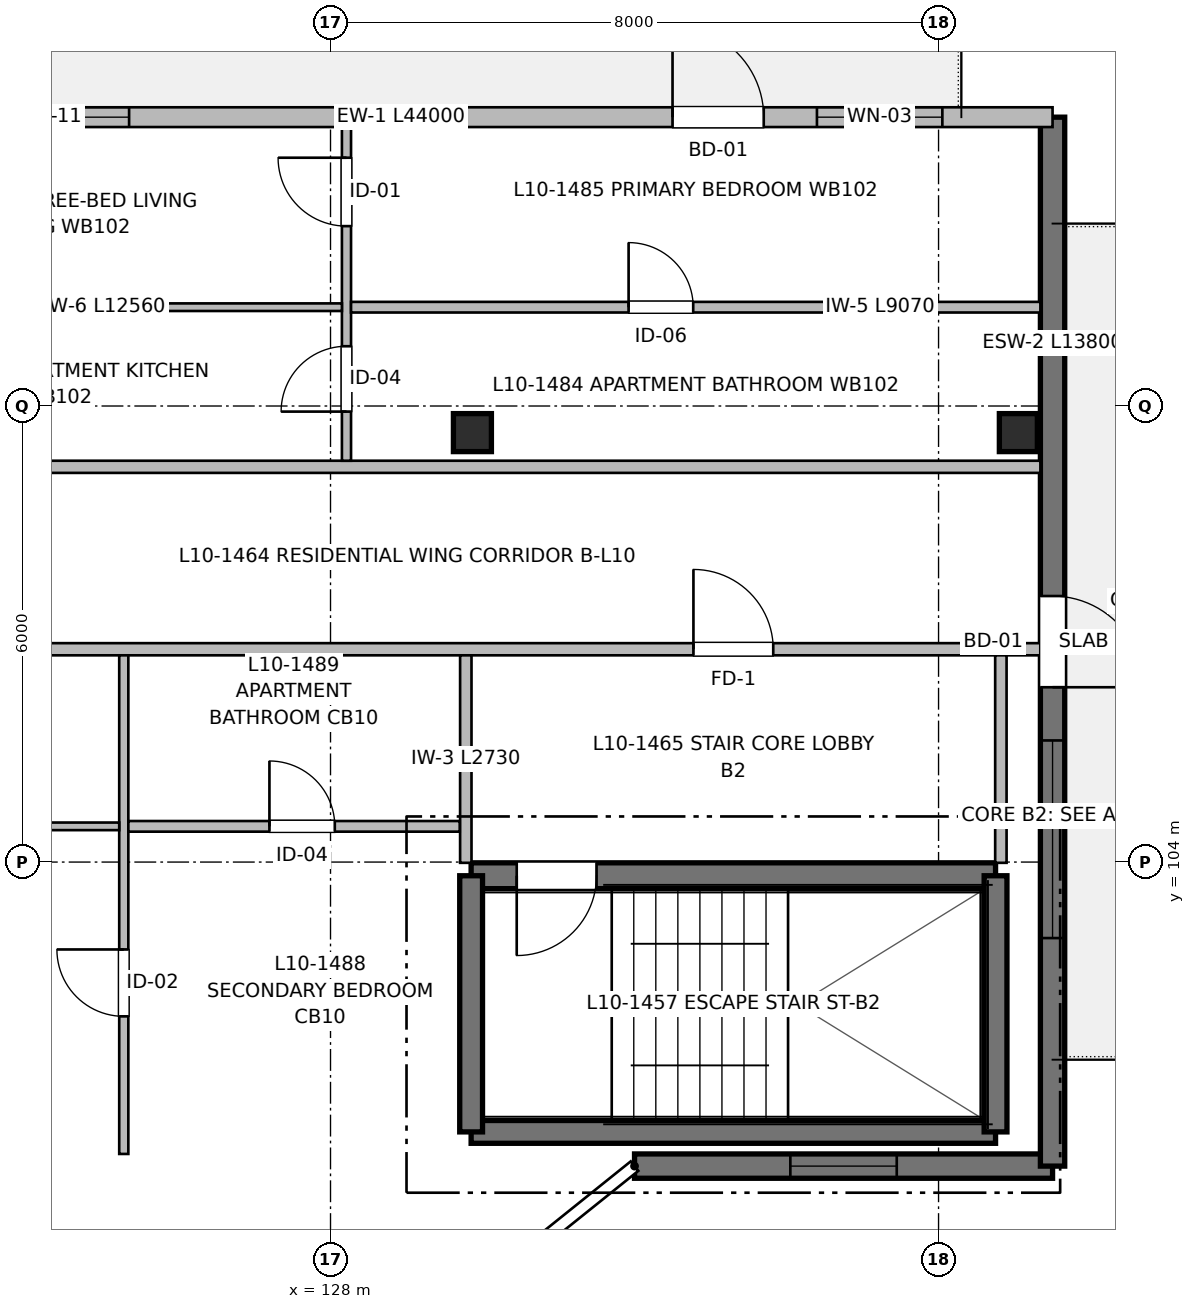
"""IFC4 building model, lengths in metres.
Left out: names, types, materials, properties, quantities, classifications, styles, units other than length and angle.
Written with IfcOpenShell. Run it as: python <this file> out.ifc"""

import sys

from ifc_helpers import new_model, si_unit, direction, frame, frame_2d, origin, origin_2d, place, context, subcontext, project, spatial, rectangle, extrude, element, fill, save


model = new_model("IFC4")
c1 = context("Model", 3, precision=1e-05, world=origin(), true_north=direction((0.0, 1.0)))
c2 = subcontext(c1, "Body", "Model", "MODEL_VIEW")
j1 = project(units=[si_unit("LENGTHUNIT", "METRE"), si_unit("PLANEANGLEUNIT", "RADIAN")], contexts=[c1])
p1 = place(None, origin())
s1 = spatial("IfcSite", under=j1, at=p1, CompositionType="ELEMENT")
p2 = place(p1, origin())
s2 = spatial("IfcBuilding", under=s1, at=p2, CompositionType="ELEMENT")
p3 = place(p2, frame((0.0, 0.0, 32.96)))
s3 = spatial("IfcBuildingStorey", under=s2, at=p3, CompositionType="ELEMENT", Elevation=32.96)
for number, where, z_axis, x_axis in (
    (1, (129.867, 109.65, 0.0), (0.0, 0.0, 1.0), (1.0, 0.0, 0.0)),
    (2, (137.05, 109.65, 0.0), (0.0, 0.0, 1.0), (1.0, 0.0, 0.0)),
):
    element("IfcColumn", number, at=place(p3, frame(where, z_axis=z_axis, x_axis=x_axis)), inside=s3, PredefinedType="COLUMN", context=c2, shape_type="SweptSolid", body=[
        extrude(rectangle(XDim=0.5, YDim=0.5, at=origin_2d()), origin(), (0.0, 0.0, 1.0), 3.2),
    ])
p4 = place(p3, frame((129.85, 100.45, 0.0), z_axis=(0.0, 0.0, 1.0), x_axis=(1.0, 0.0, 0.0)))
e3 = element("IfcWall", 3, at=p4, inside=s3, PredefinedType="SHEAR", context=c2, shape_type="SweptSolid", body=[
    extrude(rectangle(XDim=6.9, YDim=0.3, at=frame_2d((3.45, 0.0))), origin(), (0.0, 0.0, 1.0), 3.2),
])
p5 = place(p3, frame((136.75, 103.82, 0.0), z_axis=(0.0, 0.0, 1.0), x_axis=(-1.0, 0.0, 0.0)))
e4 = element("IfcWall", 4, at=p5, inside=s3, PredefinedType="SHEAR", context=c2, shape_type="SweptSolid", body=[
    extrude(rectangle(XDim=6.9, YDim=0.34, at=frame_2d((3.45, 0.0))), origin(), (0.0, 0.0, 1.0), 3.2),
])
p6 = place(p5, frame((5.25, 0.0, 0.0)))
e5 = element("IfcOpeningElement", 5, at=p6, cuts=e4, PredefinedType="OPENING", context=c2, shape_type="SweptSolid", body=[
    extrude(rectangle(XDim=1.05, YDim=2.15, at=frame_2d((0.525, 1.075))), frame((0.0, 0.18, 0.0), z_axis=(0.0, -1.0, 0.0), x_axis=(1.0, 0.0, 0.0)), (0.0, 0.0, 1.0), 0.36),
])
for number, where, z_axis, x_axis in (
    (6, (129.85, 103.82, 0.0), (0.0, 0.0, 1.0), (0.0, -1.0, 0.0)),
    (7, (136.75, 100.45, 0.0), (0.0, 0.0, 1.0), (0.0, 1.0, 0.0)),
):
    element("IfcWall", number, at=place(p3, frame(where, z_axis=z_axis, x_axis=x_axis)), inside=s3, PredefinedType="SHEAR", context=c2, shape_type="SweptSolid", body=[
        extrude(rectangle(XDim=3.37, YDim=0.3, at=frame_2d((1.685, 0.0))), origin(), (0.0, 0.0, 1.0), 3.2),
    ])
p7 = place(p3, frame((137.5, 100.0, 0.0), z_axis=(0.0, 0.0, 1.0), x_axis=(-1.0, 0.0, 0.0)))
e8 = element("IfcWall", 8, at=p7, inside=s3, PredefinedType="SHEAR", context=c2, shape_type="SweptSolid", body=[
    extrude(rectangle(XDim=5.5, YDim=0.32, at=frame_2d((2.75, 0.0))), origin(), (0.0, 0.0, 1.0), 2.98),
])
p8 = place(p7, frame((2.05, 0.0, 0.87)))
e9 = element("IfcOpeningElement", 9, at=p8, cuts=e8, PredefinedType="OPENING", context=c2, shape_type="SweptSolid", body=[
    extrude(rectangle(XDim=1.4, YDim=1.35, at=frame_2d((0.7, 0.675))), frame((0.0, 0.17, 0.0), z_axis=(0.0, -1.0, 0.0), x_axis=(1.0, 0.0, 0.0)), (0.0, 0.0, 1.0), 0.34),
])
p9 = place(p3, frame((137.5, 113.8, 0.0), z_axis=(0.0, 0.0, 1.0), x_axis=(0.0, -1.0, 0.0)))
e10 = element("IfcWall", 10, at=p9, inside=s3, PredefinedType="SHEAR", context=c2, shape_type="SweptSolid", body=[
    extrude(rectangle(XDim=13.8, YDim=0.32, at=frame_2d((6.9, 0.0))), origin(), (0.0, 0.0, 1.0), 2.98),
])
p10 = place(p9, frame((6.3, 0.0, 0.0)))
e11 = element("IfcOpeningElement", 11, at=p10, cuts=e10, PredefinedType="OPENING", context=c2, shape_type="SweptSolid", body=[
    extrude(rectangle(XDim=1.2, YDim=2.2, at=frame_2d((0.6, 1.1))), frame((0.0, 0.17, 0.0), z_axis=(0.0, -1.0, 0.0), x_axis=(1.0, 0.0, 0.0)), (0.0, 0.0, 1.0), 0.34),
])
p11 = place(p9, frame((8.2, 0.0, 0.67)))
e12 = element("IfcOpeningElement", 12, at=p11, cuts=e10, PredefinedType="OPENING", context=c2, shape_type="SweptSolid", body=[
    extrude(rectangle(XDim=2.6, YDim=1.55, at=frame_2d((1.3, 0.775))), frame((0.0, 0.17, 0.0), z_axis=(0.0, -1.0, 0.0), x_axis=(1.0, 0.0, 0.0)), (0.0, 0.0, 1.0), 0.34),
])
p12 = place(p3, frame((93.5, 113.8, 0.0), z_axis=(0.0, 0.0, 1.0), x_axis=(1.0, 0.0, 0.0)))
e13 = element("IfcWall", 13, at=p12, inside=s3, PredefinedType="SOLIDWALL", context=c2, shape_type="SweptSolid", body=[
    extrude(rectangle(XDim=44.0, YDim=0.26, at=frame_2d((22.0, 0.0))), origin(), (0.0, 0.0, 1.0), 2.98),
])
p13 = place(p12, frame((3.8, 0.0, 0.0)))
e14 = element("IfcOpeningElement", 14, at=p13, cuts=e13, PredefinedType="OPENING", context=c2, shape_type="SweptSolid", body=[
    extrude(rectangle(XDim=1.2, YDim=2.2, at=frame_2d((0.6, 1.1))), frame((0.0, 0.14, 0.0), z_axis=(0.0, -1.0, 0.0), x_axis=(1.0, 0.0, 0.0)), (0.0, 0.0, 1.0), 0.28),
])
p14 = place(p12, frame((5.7, 0.0, 0.67)))
e15 = element("IfcOpeningElement", 15, at=p14, cuts=e13, PredefinedType="OPENING", context=c2, shape_type="SweptSolid", body=[
    extrude(rectangle(XDim=2.6, YDim=1.55, at=frame_2d((1.3, 0.775))), frame((0.0, 0.14, 0.0), z_axis=(0.0, -1.0, 0.0), x_axis=(1.0, 0.0, 0.0)), (0.0, 0.0, 1.0), 0.28),
])
p15 = place(p12, frame((13.025, 0.0, 0.87)))
e16 = element("IfcOpeningElement", 16, at=p15, cuts=e13, PredefinedType="OPENING", context=c2, shape_type="SweptSolid", body=[
    extrude(rectangle(XDim=1.25, YDim=1.35, at=frame_2d((0.625, 0.675))), frame((0.0, 0.14, 0.0), z_axis=(0.0, -1.0, 0.0), x_axis=(1.0, 0.0, 0.0)), (0.0, 0.0, 1.0), 0.28),
])
p16 = place(p12, frame((20.1, 0.0, 0.0)))
e17 = element("IfcOpeningElement", 17, at=p16, cuts=e13, PredefinedType="OPENING", context=c2, shape_type="SweptSolid", body=[
    extrude(rectangle(XDim=1.2, YDim=2.2, at=frame_2d((0.6, 1.1))), frame((0.0, 0.14, 0.0), z_axis=(0.0, -1.0, 0.0), x_axis=(1.0, 0.0, 0.0)), (0.0, 0.0, 1.0), 0.28),
])
p17 = place(p12, frame((23.3, 0.0, 0.72)))
e18 = element("IfcOpeningElement", 18, at=p17, cuts=e13, PredefinedType="OPENING", context=c2, shape_type="SweptSolid", body=[
    extrude(rectangle(XDim=1.8, YDim=1.5, at=frame_2d((0.9, 0.75))), frame((0.0, 0.14, 0.0), z_axis=(0.0, -1.0, 0.0), x_axis=(1.0, 0.0, 0.0)), (0.0, 0.0, 1.0), 0.28),
])
p18 = place(p12, frame((29.75, 0.0, 0.67)))
e19 = element("IfcOpeningElement", 19, at=p18, cuts=e13, PredefinedType="OPENING", context=c2, shape_type="SweptSolid", body=[
    extrude(rectangle(XDim=2.1, YDim=1.55, at=frame_2d((1.05, 0.775))), frame((0.0, 0.14, 0.0), z_axis=(0.0, -1.0, 0.0), x_axis=(1.0, 0.0, 0.0)), (0.0, 0.0, 1.0), 0.28),
])
p19 = place(p12, frame((39.0, 0.0, 0.0)))
e20 = element("IfcOpeningElement", 20, at=p19, cuts=e13, PredefinedType="OPENING", context=c2, shape_type="SweptSolid", body=[
    extrude(rectangle(XDim=1.2, YDim=2.2, at=frame_2d((0.6, 1.1))), frame((0.0, 0.14, 0.0), z_axis=(0.0, -1.0, 0.0), x_axis=(1.0, 0.0, 0.0)), (0.0, 0.0, 1.0), 0.28),
])
p20 = place(p12, frame((40.9, 0.0, 0.77)))
e21 = element("IfcOpeningElement", 21, at=p20, cuts=e13, PredefinedType="OPENING", context=c2, shape_type="SweptSolid", body=[
    extrude(rectangle(XDim=1.65, YDim=1.45, at=frame_2d((0.825, 0.725))), frame((0.0, 0.14, 0.0), z_axis=(0.0, -1.0, 0.0), x_axis=(1.0, 0.0, 0.0)), (0.0, 0.0, 1.0), 0.28),
])
p21 = place(p3, frame((113.2, 106.8, 0.0), z_axis=(0.0, 0.0, 1.0), x_axis=(1.0, 0.0, 0.0)))
e22 = element("IfcWall", 22, at=p21, inside=s3, PredefinedType="PARTITIONING", context=c2, shape_type="SweptSolid", body=[
    extrude(rectangle(XDim=24.14, YDim=0.16, at=frame_2d((12.07, 0.0))), origin(), (0.0, 0.0, 1.0), 2.935),
])
p22 = place(p21, frame((19.575, 0.0, 0.0)))
e23 = element("IfcOpeningElement", 23, at=p22, cuts=e22, PredefinedType="OPENING", context=c2, shape_type="SweptSolid", body=[
    extrude(rectangle(XDim=1.05, YDim=2.15, at=frame_2d((0.525, 1.075))), frame((0.0, 0.09, 0.0), z_axis=(0.0, -1.0, 0.0), x_axis=(1.0, 0.0, 0.0)), (0.0, 0.0, 1.0), 0.18),
])
p23 = place(p21, frame((8.995, 0.0, 0.0)))
e24 = element("IfcOpeningElement", 24, at=p23, cuts=e22, PredefinedType="OPENING", context=c2, shape_type="SweptSolid", body=[
    extrude(rectangle(XDim=0.98, YDim=2.15, at=frame_2d((0.49, 1.075))), frame((0.0, 0.09, 0.0), z_axis=(0.0, -1.0, 0.0), x_axis=(1.0, 0.0, 0.0)), (0.0, 0.0, 1.0), 0.18),
])
p24 = place(p3, frame((93.66, 109.2, 0.0), z_axis=(0.0, 0.0, 1.0), x_axis=(1.0, 0.0, 0.0)))
e25 = element("IfcWall", 25, at=p24, inside=s3, PredefinedType="PARTITIONING", context=c2, shape_type="SweptSolid", body=[
    extrude(rectangle(XDim=43.68, YDim=0.16, at=frame_2d((21.84, 0.0))), origin(), (0.0, 0.0, 1.0), 2.935),
])
p25 = place(p24, frame((5.815, 0.0, 0.0)))
e26 = element("IfcOpeningElement", 26, at=p25, cuts=e25, PredefinedType="OPENING", context=c2, shape_type="SweptSolid", body=[
    extrude(rectangle(XDim=0.98, YDim=2.15, at=frame_2d((0.49, 1.075))), frame((0.0, 0.09, 0.0), z_axis=(0.0, -1.0, 0.0), x_axis=(1.0, 0.0, 0.0)), (0.0, 0.0, 1.0), 0.18),
])
p26 = place(p24, frame((27.35, 0.0, 0.0)))
e27 = element("IfcOpeningElement", 27, at=p26, cuts=e25, PredefinedType="OPENING", context=c2, shape_type="SweptSolid", body=[
    extrude(rectangle(XDim=0.98, YDim=2.15, at=frame_2d((0.49, 1.075))), frame((0.0, 0.09, 0.0), z_axis=(0.0, -1.0, 0.0), x_axis=(1.0, 0.0, 0.0)), (0.0, 0.0, 1.0), 0.18),
])
for number, where, z_axis, x_axis in (
    (28, (129.78, 103.99, 0.0), (0.0, 0.0, 1.0), (0.0, 1.0, 0.0)),
    (29, (136.82, 103.99, 0.0), (0.0, 0.0, 1.0), (0.0, 1.0, 0.0)),
):
    element("IfcWall", number, at=place(p3, frame(where, z_axis=z_axis, x_axis=x_axis)), inside=s3, PredefinedType="PARTITIONING", context=c2, shape_type="SweptSolid", body=[
        extrude(rectangle(XDim=2.73, YDim=0.15, at=frame_2d((1.365, 0.0))), origin(), (0.0, 0.0, 1.0), 2.935),
    ])
p27 = place(p3, frame((128.21, 109.28, 0.0), z_axis=(0.0, 0.0, 1.0), x_axis=(0.0, 1.0, 0.0)))
e30 = element("IfcWall", 30, at=p27, inside=s3, PredefinedType="PARTITIONING", context=c2, shape_type="SweptSolid", body=[
    extrude(rectangle(XDim=4.39, YDim=0.12, at=frame_2d((2.195, 0.0))), origin(), (0.0, 0.0, 1.0), 2.935),
])
p28 = place(p27, frame((0.646, 0.0, 0.0)))
e31 = element("IfcOpeningElement", 31, at=p28, cuts=e30, PredefinedType="OPENING", context=c2, shape_type="SweptSolid", body=[
    extrude(rectangle(XDim=0.86, YDim=2.1, at=frame_2d((0.43, 1.05))), frame((0.0, 0.07, 0.0), z_axis=(0.0, -1.0, 0.0), x_axis=(1.0, 0.0, 0.0)), (0.0, 0.0, 1.0), 0.14),
])
p29 = place(p27, frame((3.086, 0.0, 0.0)))
e32 = element("IfcOpeningElement", 32, at=p29, cuts=e30, PredefinedType="OPENING", context=c2, shape_type="SweptSolid", body=[
    extrude(rectangle(XDim=0.9, YDim=2.1, at=frame_2d((0.45, 1.05))), frame((0.0, 0.07, 0.0), z_axis=(0.0, -1.0, 0.0), x_axis=(1.0, 0.0, 0.0)), (0.0, 0.0, 1.0), 0.14),
])
p30 = place(p3, frame((128.27, 111.3, 0.0), z_axis=(0.0, 0.0, 1.0), x_axis=(1.0, 0.0, 0.0)))
e33 = element("IfcWall", 33, at=p30, inside=s3, PredefinedType="PARTITIONING", context=c2, shape_type="SweptSolid", body=[
    extrude(rectangle(XDim=9.07, YDim=0.14, at=frame_2d((4.535, 0.0))), origin(), (0.0, 0.0, 1.0), 2.935),
])
p31 = place(p30, frame((3.652, 0.0, 0.0)))
e34 = element("IfcOpeningElement", 34, at=p31, cuts=e33, PredefinedType="OPENING", context=c2, shape_type="SweptSolid", body=[
    extrude(rectangle(XDim=0.85, YDim=2.05, at=frame_2d((0.425, 1.025))), frame((0.0, 0.08, 0.0), z_axis=(0.0, -1.0, 0.0), x_axis=(1.0, 0.0, 0.0)), (0.0, 0.0, 1.0), 0.16),
])
p32 = place(p3, frame((115.59, 111.3, 0.0), z_axis=(0.0, 0.0, 1.0), x_axis=(1.0, 0.0, 0.0)))
e35 = element("IfcWall", 35, at=p32, inside=s3, PredefinedType="PARTITIONING", context=c2, shape_type="SweptSolid", body=[
    extrude(rectangle(XDim=12.56, YDim=0.1, at=frame_2d((6.28, 0.0))), origin(), (0.0, 0.0, 1.0), 2.935),
])
p33 = place(p32, frame((5.048, 0.0, 0.0)))
e36 = element("IfcOpeningElement", 36, at=p33, cuts=e35, PredefinedType="OPENING", context=c2, shape_type="SweptSolid", body=[
    extrude(rectangle(XDim=0.92, YDim=2.1, at=frame_2d((0.46, 1.05))), frame((0.0, 0.06, 0.0), z_axis=(0.0, -1.0, 0.0), x_axis=(1.0, 0.0, 0.0)), (0.0, 0.0, 1.0), 0.12),
])
p34 = place(p3, frame((125.28, 100.16, 0.0), z_axis=(0.0, 0.0, 1.0), x_axis=(0.0, 1.0, 0.0)))
e37 = element("IfcWall", 37, at=p34, inside=s3, PredefinedType="PARTITIONING", context=c2, shape_type="SweptSolid", body=[
    extrude(rectangle(XDim=6.56, YDim=0.12, at=frame_2d((3.28, 0.0))), origin(), (0.0, 0.0, 1.0), 2.935),
])
p35 = place(p34, frame((1.81, 0.0, 0.0)))
e38 = element("IfcOpeningElement", 38, at=p35, cuts=e37, PredefinedType="OPENING", context=c2, shape_type="SweptSolid", body=[
    extrude(rectangle(XDim=0.88, YDim=2.1, at=frame_2d((0.44, 1.05))), frame((0.0, 0.07, 0.0), z_axis=(0.0, -1.0, 0.0), x_axis=(1.0, 0.0, 0.0)), (0.0, 0.0, 1.0), 0.14),
])
p36 = place(p3, frame((125.34, 104.47, 0.0), z_axis=(0.0, 0.0, 1.0), x_axis=(1.0, 0.0, 0.0)))
e39 = element("IfcWall", 39, at=p36, inside=s3, PredefinedType="PARTITIONING", context=c2, shape_type="SweptSolid", body=[
    extrude(rectangle(XDim=4.36, YDim=0.14, at=frame_2d((2.18, 0.0))), origin(), (0.0, 0.0, 1.0), 2.935),
])
p37 = place(p36, frame((1.856, 0.0, 0.0)))
e40 = element("IfcOpeningElement", 40, at=p37, cuts=e39, PredefinedType="OPENING", context=c2, shape_type="SweptSolid", body=[
    extrude(rectangle(XDim=0.86, YDim=2.1, at=frame_2d((0.43, 1.05))), frame((0.0, 0.08, 0.0), z_axis=(0.0, -1.0, 0.0), x_axis=(1.0, 0.0, 0.0)), (0.0, 0.0, 1.0), 0.16),
])
p38 = place(p3, frame((120.09, 104.47, 0.0), z_axis=(0.0, 0.0, 1.0), x_axis=(1.0, 0.0, 0.0)))
e41 = element("IfcWall", 41, at=p38, inside=s3, PredefinedType="PARTITIONING", context=c2, shape_type="SweptSolid", body=[
    extrude(rectangle(XDim=5.13, YDim=0.1, at=frame_2d((2.565, 0.0))), origin(), (0.0, 0.0, 1.0), 2.935),
])
p39 = place(p38, frame((2.18, 0.0, 0.0)))
e42 = element("IfcOpeningElement", 42, at=p39, cuts=e41, PredefinedType="OPENING", context=c2, shape_type="SweptSolid", body=[
    extrude(rectangle(XDim=0.92, YDim=2.1, at=frame_2d((0.46, 1.05))), frame((0.0, 0.06, 0.0), z_axis=(0.0, -1.0, 0.0), x_axis=(1.0, 0.0, 0.0)), (0.0, 0.0, 1.0), 0.12),
])
p40 = place(p6, origin())
e43 = element("IfcDoor", 43, at=p40, inside=s3, OperationType="SINGLE_SWING_RIGHT", PredefinedType="DOOR", context=c2, shape_type="SweptSolid", body=[
    extrude(rectangle(XDim=1.05, YDim=2.15, at=frame_2d((0.525, 1.075))), frame((0.0, 0.025, 0.0), z_axis=(0.0, -1.0, 0.0), x_axis=(1.0, 0.0, 0.0)), (0.0, 0.0, 1.0), 0.05),
])
fill(e5, e43)
p41 = place(p8, origin())
e44 = element("IfcWindow", 44, at=p41, inside=s3, PartitioningType="SINGLE_PANEL", PredefinedType="WINDOW", context=c2, shape_type="SweptSolid", body=[
    extrude(rectangle(XDim=1.4, YDim=1.35, at=frame_2d((0.7, 0.675))), frame((0.0, 0.03, 0.0), z_axis=(0.0, -1.0, 0.0), x_axis=(1.0, 0.0, 0.0)), (0.0, 0.0, 1.0), 0.06),
])
fill(e9, e44)
p42 = place(p10, origin())
e45 = element("IfcDoor", 45, at=p42, inside=s3, OperationType="SINGLE_SWING_RIGHT", PredefinedType="DOOR", context=c2, shape_type="SweptSolid", body=[
    extrude(rectangle(XDim=1.2, YDim=2.2, at=frame_2d((0.6, 1.1))), frame((0.0, 0.025, 0.0), z_axis=(0.0, -1.0, 0.0), x_axis=(1.0, 0.0, 0.0)), (0.0, 0.0, 1.0), 0.05),
])
fill(e11, e45)
p43 = place(p11, origin())
e46 = element("IfcWindow", 46, at=p43, inside=s3, PartitioningType="SINGLE_PANEL", PredefinedType="WINDOW", context=c2, shape_type="SweptSolid", body=[
    extrude(rectangle(XDim=2.6, YDim=1.55, at=frame_2d((1.3, 0.775))), frame((0.0, 0.03, 0.0), z_axis=(0.0, -1.0, 0.0), x_axis=(1.0, 0.0, 0.0)), (0.0, 0.0, 1.0), 0.06),
])
fill(e12, e46)
p44 = place(p18, origin())
e47 = element("IfcWindow", 47, at=p44, inside=s3, PartitioningType="SINGLE_PANEL", PredefinedType="WINDOW", context=c2, shape_type="SweptSolid", body=[
    extrude(rectangle(XDim=2.1, YDim=1.55, at=frame_2d((1.05, 0.775))), frame((0.0, 0.03, 0.0), z_axis=(0.0, -1.0, 0.0), x_axis=(1.0, 0.0, 0.0)), (0.0, 0.0, 1.0), 0.06),
])
fill(e19, e47)
p45 = place(p19, origin())
e48 = element("IfcDoor", 48, at=p45, inside=s3, OperationType="SINGLE_SWING_LEFT", PredefinedType="DOOR", context=c2, shape_type="SweptSolid", body=[
    extrude(rectangle(XDim=1.2, YDim=2.2, at=frame_2d((0.6, 1.1))), frame((0.0, 0.025, 0.0), z_axis=(0.0, -1.0, 0.0), x_axis=(1.0, 0.0, 0.0)), (0.0, 0.0, 1.0), 0.05),
])
fill(e20, e48)
p46 = place(p20, origin())
e49 = element("IfcWindow", 49, at=p46, inside=s3, PartitioningType="SINGLE_PANEL", PredefinedType="WINDOW", context=c2, shape_type="SweptSolid", body=[
    extrude(rectangle(XDim=1.65, YDim=1.45, at=frame_2d((0.825, 0.725))), frame((0.0, 0.03, 0.0), z_axis=(0.0, -1.0, 0.0), x_axis=(1.0, 0.0, 0.0)), (0.0, 0.0, 1.0), 0.06),
])
fill(e21, e49)
p47 = place(p22, origin())
e50 = element("IfcDoor", 50, at=p47, inside=s3, OperationType="SINGLE_SWING_LEFT", PredefinedType="DOOR", context=c2, shape_type="SweptSolid", body=[
    extrude(rectangle(XDim=1.05, YDim=2.15, at=frame_2d((0.525, 1.075))), frame((0.0, 0.025, 0.0), z_axis=(0.0, -1.0, 0.0), x_axis=(1.0, 0.0, 0.0)), (0.0, 0.0, 1.0), 0.05),
])
fill(e23, e50)
p48 = place(p28, origin())
e51 = element("IfcDoor", 51, at=p48, inside=s3, OperationType="SINGLE_SWING_LEFT", PredefinedType="DOOR", context=c2, shape_type="SweptSolid", body=[
    extrude(rectangle(XDim=0.86, YDim=2.1, at=frame_2d((0.43, 1.05))), frame((0.0, 0.025, 0.0), z_axis=(0.0, -1.0, 0.0), x_axis=(1.0, 0.0, 0.0)), (0.0, 0.0, 1.0), 0.05),
])
fill(e31, e51)
p49 = place(p29, origin())
e52 = element("IfcDoor", 52, at=p49, inside=s3, OperationType="SINGLE_SWING_RIGHT", PredefinedType="DOOR", context=c2, shape_type="SweptSolid", body=[
    extrude(rectangle(XDim=0.9, YDim=2.1, at=frame_2d((0.45, 1.05))), frame((0.0, 0.025, 0.0), z_axis=(0.0, -1.0, 0.0), x_axis=(1.0, 0.0, 0.0)), (0.0, 0.0, 1.0), 0.05),
])
fill(e32, e52)
p50 = place(p31, origin())
e53 = element("IfcDoor", 53, at=p50, inside=s3, OperationType="SINGLE_SWING_LEFT", PredefinedType="DOOR", context=c2, shape_type="SweptSolid", body=[
    extrude(rectangle(XDim=0.85, YDim=2.05, at=frame_2d((0.425, 1.025))), frame((0.0, 0.025, 0.0), z_axis=(0.0, -1.0, 0.0), x_axis=(1.0, 0.0, 0.0)), (0.0, 0.0, 1.0), 0.05),
])
fill(e34, e53)
p51 = place(p35, origin())
e54 = element("IfcDoor", 54, at=p51, inside=s3, OperationType="SINGLE_SWING_RIGHT", PredefinedType="DOOR", context=c2, shape_type="SweptSolid", body=[
    extrude(rectangle(XDim=0.88, YDim=2.1, at=frame_2d((0.44, 1.05))), frame((0.0, 0.025, 0.0), z_axis=(0.0, -1.0, 0.0), x_axis=(1.0, 0.0, 0.0)), (0.0, 0.0, 1.0), 0.05),
])
fill(e38, e54)
p52 = place(p37, origin())
e55 = element("IfcDoor", 55, at=p52, inside=s3, OperationType="SINGLE_SWING_LEFT", PredefinedType="DOOR", context=c2, shape_type="SweptSolid", body=[
    extrude(rectangle(XDim=0.86, YDim=2.1, at=frame_2d((0.43, 1.05))), frame((0.0, 0.025, 0.0), z_axis=(0.0, -1.0, 0.0), x_axis=(1.0, 0.0, 0.0)), (0.0, 0.0, 1.0), 0.05),
])
fill(e40, e55)
save(model, sys.argv[1])
